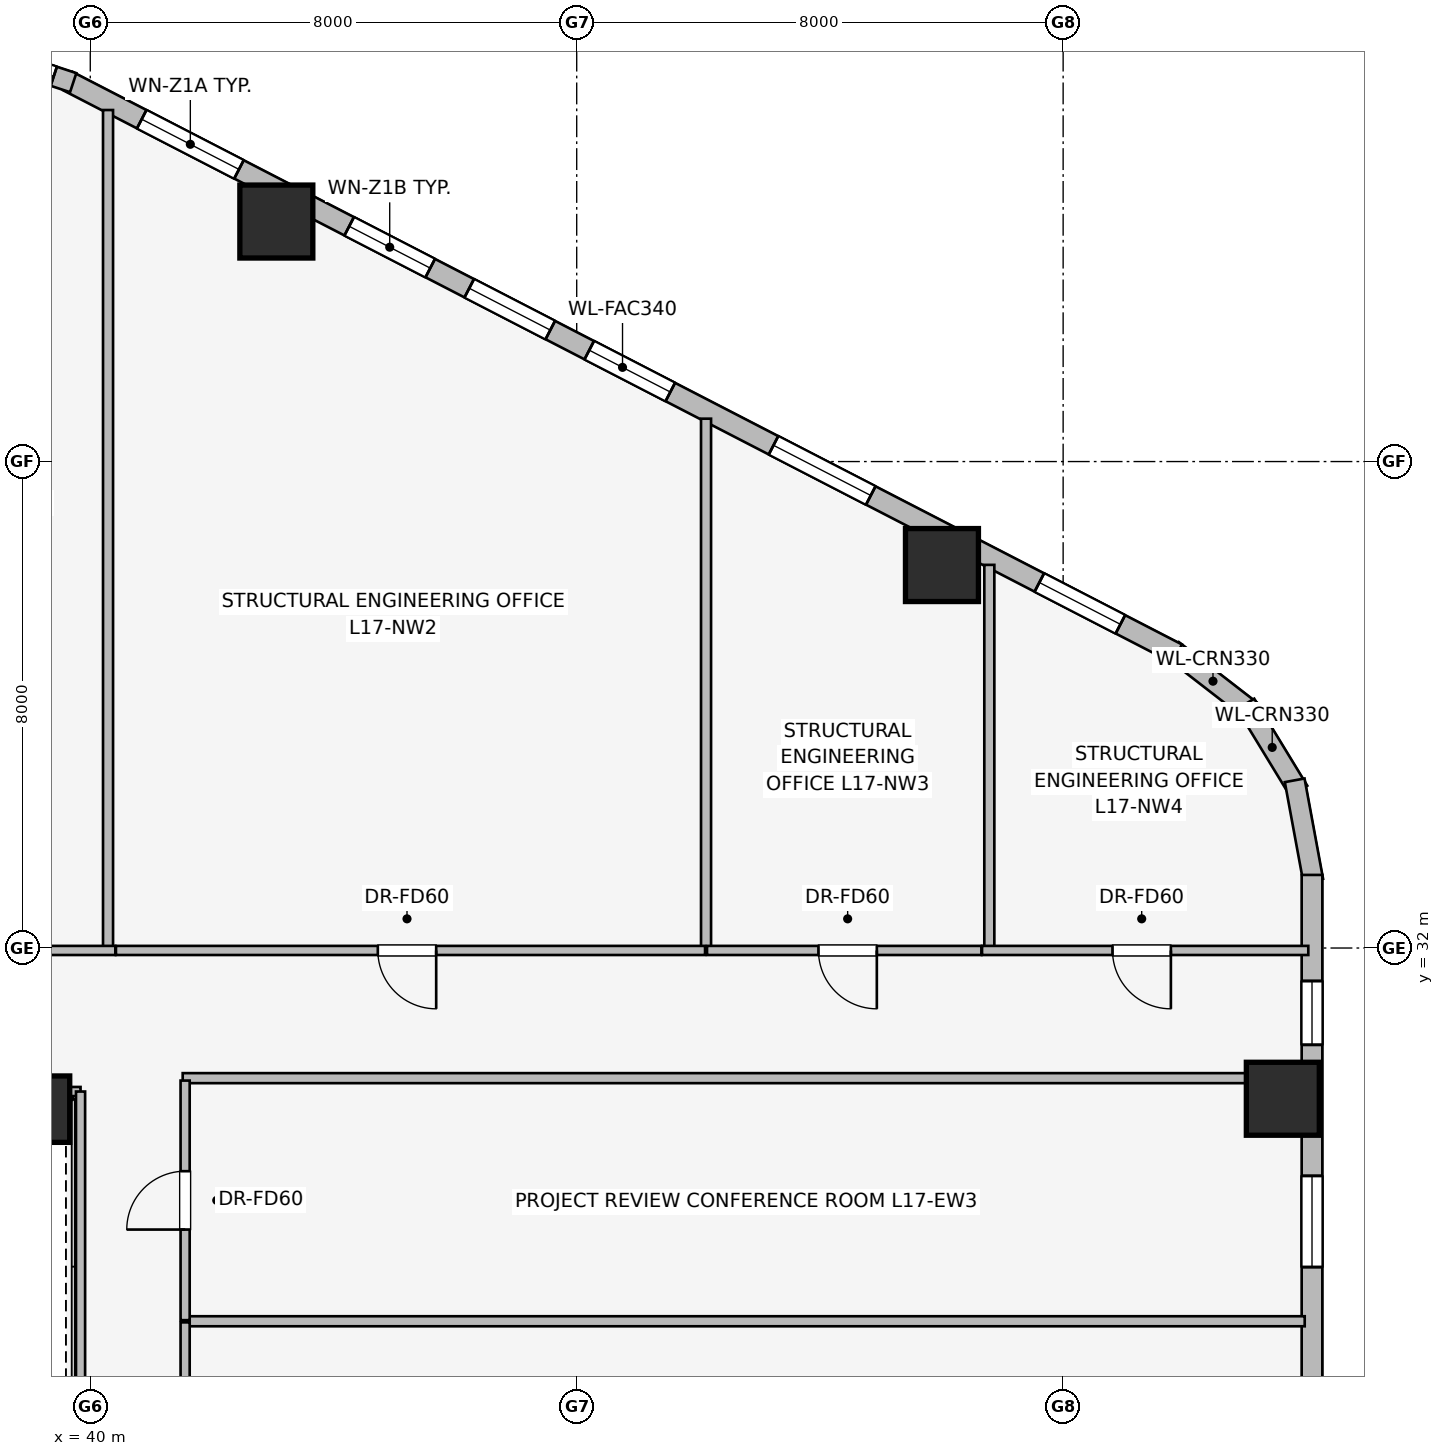
"""IFC4 building model, lengths in metres.
Left out: names, types, materials, properties, quantities, classifications, styles, units other than length and angle.
Written with IfcOpenShell. Run it as: python <this file> out.ifc"""

import sys

from ifc_helpers import new_model, si_unit, direction, frame, frame_2d, origin, origin_2d, place, context, subcontext, project, spatial, rectangle, i_section, extrude, element, fill, save


model = new_model("IFC4")
c1 = context("Model", 3, precision=1e-05, world=origin(), true_north=direction((0.0, 1.0)))
c2 = subcontext(c1, "Body", "Model", "MODEL_VIEW")
j1 = project(units=[si_unit("LENGTHUNIT", "METRE"), si_unit("PLANEANGLEUNIT", "RADIAN")], contexts=[c1])
p1 = place(None, origin())
s1 = spatial("IfcSite", under=j1, at=p1, CompositionType="ELEMENT")
p2 = place(p1, origin())
s2 = spatial("IfcBuilding", under=s1, at=p2, CompositionType="ELEMENT")
p3 = place(p2, frame((0.0, 0.0, 67.15)))
s3 = spatial("IfcBuildingStorey", under=s2, at=p3, CompositionType="ELEMENT", Elevation=67.15)
for number, where, z_axis, x_axis in (
    (1, (54.007, 38.298, 0.0), (0.0, 0.0, 1.0), (1.0, 0.0, 0.0)),
    (2, (43.06, 43.947, 0.0), (0.0, 0.0, 1.0), (1.0, 0.0, 0.0)),
    (3, (59.613, 29.521, 0.0), (0.0, 0.0, 1.0), (1.0, 0.0, 0.0)),
):
    element("IfcColumn", number, at=place(p3, frame(where, z_axis=z_axis, x_axis=x_axis)), inside=s3, PredefinedType="COLUMN", context=c2, shape_type="SweptSolid", body=[
        extrude(rectangle(XDim=1.2, YDim=1.2, at=origin_2d()), origin(), (0.0, 0.0, 1.0), 3.65),
    ])
p4 = place(p3, frame((39.45, 29.35, 0.0), z_axis=(0.0, 0.0, 1.0), x_axis=(1.0, 0.0, 0.0)))
e4 = element("IfcColumn", 4, at=p4, inside=s3, PredefinedType="COLUMN", context=c2, shape_type="SweptSolid", body=[
    extrude(i_section(OverallWidth=0.424, OverallDepth=1.092, WebThickness=0.045, FlangeThickness=0.082, at=origin_2d()), origin(), (0.0, 0.0, 1.0), 3.65),
])
p5 = place(p3, frame((57.802, 36.901, 0.0), z_axis=(0.0, 0.0, 1.0), x_axis=(0.790691856293, -0.61221433207, 0.0)))
e5 = element("IfcWall", 5, at=p5, inside=s3, PredefinedType="STANDARD", context=c2, shape_type="SweptSolid", body=[
    extrude(rectangle(XDim=1.676, YDim=0.33, at=frame_2d((0.838, 0.0))), origin(), (0.0, 0.0, 1.0), 3.39),
])
p6 = place(p3, frame((59.002, 36.015, 0.0), z_axis=(0.0, 0.0, 1.0), x_axis=(0.520584129191, -0.853810379671, 0.0)))
e6 = element("IfcWall", 6, at=p6, inside=s3, PredefinedType="STANDARD", context=c2, shape_type="SweptSolid", body=[
    extrude(rectangle(XDim=1.677, YDim=0.33, at=frame_2d((0.838, 0.0))), origin(), (0.0, 0.0, 1.0), 3.39),
])
p7 = place(p3, frame((59.808, 34.758, 0.0), z_axis=(0.0, 0.0, 1.0), x_axis=(0.181714143354, -0.983351397063, 0.0)))
e7 = element("IfcWall", 7, at=p7, inside=s3, PredefinedType="STANDARD", context=c2, shape_type="SweptSolid", body=[
    extrude(rectangle(XDim=1.678, YDim=0.33, at=frame_2d((0.839, 0.0))), origin(), (0.0, 0.0, 1.0), 3.39),
])
p8 = place(p3, frame((39.631, 46.257, 0.0), z_axis=(0.0, 0.0, 1.0), x_axis=(0.888634413993, -0.458616264721, 0.0)))
e8 = element("IfcWall", 8, at=p8, inside=s3, PredefinedType="STANDARD", context=c2, shape_type="SweptSolid", body=[
    extrude(rectangle(XDim=20.531, YDim=0.34, at=frame_2d((10.266, 0.0))), origin(), (0.0, 0.0, 1.0), 2.684),
])
p9 = place(p8, frame((1.367, 0.0, 0.75)))
e9 = element("IfcOpeningElement", 9, at=p9, cuts=e8, PredefinedType="OPENING", context=c2, shape_type="SweptSolid", body=[
    extrude(rectangle(XDim=1.8, YDim=1.5, at=frame_2d((0.9, 0.75))), frame((0.0, 0.18, 0.0), z_axis=(0.0, -1.0, 0.0), x_axis=(1.0, 0.0, 0.0)), (0.0, 0.0, 1.0), 0.36),
])
p10 = place(p8, frame((5.207, 0.0, 0.75)))
e10 = element("IfcOpeningElement", 10, at=p10, cuts=e8, PredefinedType="OPENING", context=c2, shape_type="SweptSolid", body=[
    extrude(rectangle(XDim=1.5, YDim=1.5, at=frame_2d((0.75, 0.75))), frame((0.0, 0.18, 0.0), z_axis=(0.0, -1.0, 0.0), x_axis=(1.0, 0.0, 0.0)), (0.0, 0.0, 1.0), 0.36),
])
p11 = place(p8, frame((7.429, 0.0, 0.75)))
e11 = element("IfcOpeningElement", 11, at=p11, cuts=e8, PredefinedType="OPENING", context=c2, shape_type="SweptSolid", body=[
    extrude(rectangle(XDim=1.5, YDim=1.5, at=frame_2d((0.75, 0.75))), frame((0.0, 0.18, 0.0), z_axis=(0.0, -1.0, 0.0), x_axis=(1.0, 0.0, 0.0)), (0.0, 0.0, 1.0), 0.36),
])
p12 = place(p8, frame((9.65, 0.0, 0.75)))
e12 = element("IfcOpeningElement", 12, at=p12, cuts=e8, PredefinedType="OPENING", context=c2, shape_type="SweptSolid", body=[
    extrude(rectangle(XDim=1.5, YDim=1.5, at=frame_2d((0.75, 0.75))), frame((0.0, 0.18, 0.0), z_axis=(0.0, -1.0, 0.0), x_axis=(1.0, 0.0, 0.0)), (0.0, 0.0, 1.0), 0.36),
])
p13 = place(p8, frame((13.06, 0.0, 0.75)))
e13 = element("IfcOpeningElement", 13, at=p13, cuts=e8, PredefinedType="OPENING", context=c2, shape_type="SweptSolid", body=[
    extrude(rectangle(XDim=1.8, YDim=1.5, at=frame_2d((0.9, 0.75))), frame((0.0, 0.18, 0.0), z_axis=(0.0, -1.0, 0.0), x_axis=(1.0, 0.0, 0.0)), (0.0, 0.0, 1.0), 0.36),
])
p14 = place(p8, frame((17.98, 0.0, 0.75)))
e14 = element("IfcOpeningElement", 14, at=p14, cuts=e8, PredefinedType="OPENING", context=c2, shape_type="SweptSolid", body=[
    extrude(rectangle(XDim=1.5, YDim=1.5, at=frame_2d((0.75, 0.75))), frame((0.0, 0.18, 0.0), z_axis=(0.0, -1.0, 0.0), x_axis=(1.0, 0.0, 0.0)), (0.0, 0.0, 1.0), 0.36),
])
p15 = place(p3, frame((38.083, 46.77, 0.0), z_axis=(0.0, 0.0, 1.0), x_axis=(0.94976901097, -0.312951794691, 0.0)))
e15 = element("IfcWall", 15, at=p15, inside=s3, PredefinedType="STANDARD", context=c2, shape_type="SweptSolid", body=[
    extrude(rectangle(XDim=1.722, YDim=0.33, at=frame_2d((0.861, 0.0))), origin(), (0.0, 0.0, 1.0), 3.39),
])
p16 = place(p15, frame((0.336, 0.0, 0.75)))
e16 = element("IfcOpeningElement", 16, at=p16, cuts=e15, PredefinedType="OPENING", context=c2, shape_type="SweptSolid", body=[
    extrude(rectangle(XDim=1.05, YDim=1.4, at=frame_2d((0.525, 0.7))), frame((0.0, 0.175, 0.0), z_axis=(0.0, -1.0, 0.0), x_axis=(1.0, 0.0, 0.0)), (0.0, 0.0, 1.0), 0.35),
])
p17 = place(p3, frame((60.093, 33.202, 0.0), z_axis=(0.0, 0.0, 1.0), x_axis=(0.0, -1.0, 0.0)))
e17 = element("IfcWall", 17, at=p17, inside=s3, PredefinedType="STANDARD", context=c2, shape_type="SweptSolid", body=[
    extrude(rectangle(XDim=18.404, YDim=0.34, at=frame_2d((9.202, 0.0))), origin(), (0.0, 0.0, 1.0), 2.684),
])
p18 = place(p17, frame((1.744, 0.0, 0.75)))
e18 = element("IfcOpeningElement", 18, at=p18, cuts=e17, PredefinedType="OPENING", context=c2, shape_type="SweptSolid", body=[
    extrude(rectangle(XDim=1.05, YDim=1.4, at=frame_2d((0.525, 0.7))), frame((0.0, 0.18, 0.0), z_axis=(0.0, -1.0, 0.0), x_axis=(1.0, 0.0, 0.0)), (0.0, 0.0, 1.0), 0.36),
])
p19 = place(p17, frame((4.949, 0.0, 0.75)))
e19 = element("IfcOpeningElement", 19, at=p19, cuts=e17, PredefinedType="OPENING", context=c2, shape_type="SweptSolid", body=[
    extrude(rectangle(XDim=1.5, YDim=1.5, at=frame_2d((0.75, 0.75))), frame((0.0, 0.18, 0.0), z_axis=(0.0, -1.0, 0.0), x_axis=(1.0, 0.0, 0.0)), (0.0, 0.0, 1.0), 0.36),
])
p20 = place(p17, frame((9.0, 0.0, 0.75)))
e20 = element("IfcOpeningElement", 20, at=p20, cuts=e17, PredefinedType="OPENING", context=c2, shape_type="SweptSolid", body=[
    extrude(rectangle(XDim=1.8, YDim=1.5, at=frame_2d((0.9, 0.75))), frame((0.0, 0.18, 0.0), z_axis=(0.0, -1.0, 0.0), x_axis=(1.0, 0.0, 0.0)), (0.0, 0.0, 1.0), 0.36),
])
p21 = place(p17, frame((15.65, 0.0, 0.75)))
e21 = element("IfcOpeningElement", 21, at=p21, cuts=e17, PredefinedType="OPENING", context=c2, shape_type="SweptSolid", body=[
    extrude(rectangle(XDim=1.05, YDim=1.4, at=frame_2d((0.525, 0.7))), frame((0.0, 0.18, 0.0), z_axis=(0.0, -1.0, 0.0), x_axis=(1.0, 0.0, 0.0)), (0.0, 0.0, 1.0), 0.36),
])
p22 = place(p3, frame((39.84, 29.64, 0.0), z_axis=(0.0, 0.0, 1.0), x_axis=(-1.0, 0.0, 0.0)))
e22 = element("IfcWall", 22, at=p22, inside=s3, PredefinedType="PARTITIONING", context=c2, shape_type="SweptSolid", body=[
    extrude(rectangle(XDim=12.2, YDim=0.15, at=frame_2d((6.1, 0.0))), origin(), (0.0, 0.0, 1.0), 2.531),
])
p23 = place(p3, frame((39.84, 18.36, 0.0), z_axis=(0.0, 0.0, 1.0), x_axis=(0.0, 1.0, 0.0)))
e23 = element("IfcWall", 23, at=p23, inside=s3, PredefinedType="PARTITIONING", context=c2, shape_type="SweptSolid", body=[
    extrude(rectangle(XDim=11.28, YDim=0.15, at=frame_2d((5.64, 0.0))), origin(), (0.0, 0.0, 1.0), 2.513),
])
p24 = place(p3, frame((40.292, 31.97, 0.0), z_axis=(0.0, 0.0, 1.0), x_axis=(0.0, 1.0, 0.0)))
e24 = element("IfcWall", 24, at=p24, inside=s3, PredefinedType="PARTITIONING", context=c2, shape_type="SweptSolid", body=[
    extrude(rectangle(XDim=13.811, YDim=0.165, at=frame_2d((6.906, 0.0))), origin(), (0.0, 0.0, 1.0), 2.513),
])
p25 = place(p3, frame((50.127, 31.97, 0.0), z_axis=(0.0, 0.0, 1.0), x_axis=(0.0, 1.0, 0.0)))
e25 = element("IfcWall", 25, at=p25, inside=s3, PredefinedType="PARTITIONING", context=c2, shape_type="SweptSolid", body=[
    extrude(rectangle(XDim=8.735, YDim=0.165, at=frame_2d((4.368, 0.0))), origin(), (0.0, 0.0, 1.0), 3.39),
])
p26 = place(p3, frame((54.786, 31.97, 0.0), z_axis=(0.0, 0.0, 1.0), x_axis=(0.0, 1.0, 0.0)))
e26 = element("IfcWall", 26, at=p26, inside=s3, PredefinedType="PARTITIONING", context=c2, shape_type="SweptSolid", body=[
    extrude(rectangle(XDim=6.331, YDim=0.165, at=frame_2d((3.166, 0.0))), origin(), (0.0, 0.0, 1.0), 3.39),
])
p27 = place(p3, frame((40.412, 31.96, 0.0), z_axis=(0.0, 0.0, 1.0), x_axis=(-1.0, 0.0, 0.0)))
e27 = element("IfcWall", 27, at=p27, inside=s3, PredefinedType="PARTITIONING", context=c2, shape_type="SweptSolid", body=[
    extrude(rectangle(XDim=6.122, YDim=0.15, at=frame_2d((3.061, 0.0))), origin(), (0.0, 0.0, 1.0), 3.39),
])
p28 = place(p27, frame((2.524, 0.0, 0.0)))
e28 = element("IfcOpeningElement", 28, at=p28, cuts=e27, PredefinedType="OPENING", context=c2, shape_type="SweptSolid", body=[
    extrude(rectangle(XDim=0.96, YDim=2.0, at=frame_2d((0.48, 1.0))), frame((0.0, 0.085, 0.0), z_axis=(0.0, -1.0, 0.0), x_axis=(1.0, 0.0, 0.0)), (0.0, 0.0, 1.0), 0.17),
])
p29 = place(p3, frame((50.111, 31.96, 0.0), z_axis=(0.0, 0.0, 1.0), x_axis=(-1.0, 0.0, 0.0)))
e29 = element("IfcWall", 29, at=p29, inside=s3, PredefinedType="PARTITIONING", context=c2, shape_type="SweptSolid", body=[
    extrude(rectangle(XDim=9.689, YDim=0.15, at=frame_2d((4.844, 0.0))), origin(), (0.0, 0.0, 1.0), 3.39),
])
p30 = place(p29, frame((4.422, 0.0, 0.0)))
e30 = element("IfcOpeningElement", 30, at=p30, cuts=e29, PredefinedType="OPENING", context=c2, shape_type="SweptSolid", body=[
    extrude(rectangle(XDim=0.96, YDim=2.0, at=frame_2d((0.48, 1.0))), frame((0.0, 0.085, 0.0), z_axis=(0.0, -1.0, 0.0), x_axis=(1.0, 0.0, 0.0)), (0.0, 0.0, 1.0), 0.17),
])
p31 = place(p3, frame((54.656, 31.96, 0.0), z_axis=(0.0, 0.0, 1.0), x_axis=(-1.0, 0.0, 0.0)))
e31 = element("IfcWall", 31, at=p31, inside=s3, PredefinedType="PARTITIONING", context=c2, shape_type="SweptSolid", body=[
    extrude(rectangle(XDim=4.513, YDim=0.15, at=frame_2d((2.256, 0.0))), origin(), (0.0, 0.0, 1.0), 3.39),
])
p32 = place(p31, frame((1.72, 0.0, 0.0)))
e32 = element("IfcOpeningElement", 32, at=p32, cuts=e31, PredefinedType="OPENING", context=c2, shape_type="SweptSolid", body=[
    extrude(rectangle(XDim=0.96, YDim=2.0, at=frame_2d((0.48, 1.0))), frame((0.0, 0.085, 0.0), z_axis=(0.0, -1.0, 0.0), x_axis=(1.0, 0.0, 0.0)), (0.0, 0.0, 1.0), 0.17),
])
p33 = place(p3, frame((60.032, 31.96, 0.0), z_axis=(0.0, 0.0, 1.0), x_axis=(-1.0, 0.0, 0.0)))
e33 = element("IfcWall", 33, at=p33, inside=s3, PredefinedType="PARTITIONING", context=c2, shape_type="SweptSolid", body=[
    extrude(rectangle(XDim=5.366, YDim=0.15, at=frame_2d((2.683, 0.0))), origin(), (0.0, 0.0, 1.0), 3.39),
])
p34 = place(p33, frame((2.26, 0.0, 0.0)))
e34 = element("IfcOpeningElement", 34, at=p34, cuts=e33, PredefinedType="OPENING", context=c2, shape_type="SweptSolid", body=[
    extrude(rectangle(XDim=0.96, YDim=2.0, at=frame_2d((0.48, 1.0))), frame((0.0, 0.085, 0.0), z_axis=(0.0, -1.0, 0.0), x_axis=(1.0, 0.0, 0.0)), (0.0, 0.0, 1.0), 0.17),
])
p35 = place(p3, frame((41.52, 29.86, 0.0), z_axis=(0.0, 0.0, 1.0), x_axis=(1.0, 0.0, 0.0)))
e35 = element("IfcWall", 35, at=p35, inside=s3, PredefinedType="PARTITIONING", context=c2, shape_type="SweptSolid", body=[
    extrude(rectangle(XDim=18.453, YDim=0.165, at=frame_2d((9.227, 0.0))), origin(), (0.0, 0.0, 1.0), 3.39),
])
p36 = place(p3, frame((41.59, 25.862, 0.0), z_axis=(0.0, 0.0, 1.0), x_axis=(1.0, 0.0, 0.0)))
e36 = element("IfcWall", 36, at=p36, inside=s3, PredefinedType="PARTITIONING", context=c2, shape_type="SweptSolid", body=[
    extrude(rectangle(XDim=18.383, YDim=0.165, at=frame_2d((9.191, 0.0))), origin(), (0.0, 0.0, 1.0), 3.39),
])
p37 = place(p3, frame((41.56, 20.759, 0.0), z_axis=(0.0, 0.0, 1.0), x_axis=(0.0, 1.0, 0.0)))
e37 = element("IfcWall", 37, at=p37, inside=s3, PredefinedType="PARTITIONING", context=c2, shape_type="SweptSolid", body=[
    extrude(rectangle(XDim=5.085, YDim=0.15, at=frame_2d((2.542, 0.0))), origin(), (0.0, 0.0, 1.0), 3.39),
])
p38 = place(p37, frame((2.063, 0.0, 0.0)))
e38 = element("IfcOpeningElement", 38, at=p38, cuts=e37, PredefinedType="OPENING", context=c2, shape_type="SweptSolid", body=[
    extrude(rectangle(XDim=0.96, YDim=2.0, at=frame_2d((0.48, 1.0))), frame((0.0, 0.085, 0.0), z_axis=(0.0, -1.0, 0.0), x_axis=(1.0, 0.0, 0.0)), (0.0, 0.0, 1.0), 0.17),
])
p39 = place(p3, frame((41.56, 25.88, 0.0), z_axis=(0.0, 0.0, 1.0), x_axis=(0.0, 1.0, 0.0)))
e39 = element("IfcWall", 39, at=p39, inside=s3, PredefinedType="PARTITIONING", context=c2, shape_type="SweptSolid", body=[
    extrude(rectangle(XDim=3.94, YDim=0.15, at=frame_2d((1.97, 0.0))), origin(), (0.0, 0.0, 1.0), 3.39),
])
p40 = place(p39, frame((1.49, 0.0, 0.0)))
e40 = element("IfcOpeningElement", 40, at=p40, cuts=e39, PredefinedType="OPENING", context=c2, shape_type="SweptSolid", body=[
    extrude(rectangle(XDim=0.96, YDim=2.0, at=frame_2d((0.48, 1.0))), frame((0.0, 0.085, 0.0), z_axis=(0.0, -1.0, 0.0), x_axis=(1.0, 0.0, 0.0)), (0.0, 0.0, 1.0), 0.17),
])
p41 = place(p9, origin())
e41 = element("IfcWindow", 41, at=p41, inside=s3, PartitioningType="SINGLE_PANEL", PredefinedType="WINDOW", context=c2, shape_type="SweptSolid", body=[
    extrude(rectangle(XDim=1.8, YDim=1.5, at=frame_2d((0.9, 0.75))), frame((0.0, 0.03, 0.0), z_axis=(0.0, -1.0, 0.0), x_axis=(1.0, 0.0, 0.0)), (0.0, 0.0, 1.0), 0.06),
])
fill(e9, e41)
p42 = place(p10, origin())
e42 = element("IfcWindow", 42, at=p42, inside=s3, PartitioningType="SINGLE_PANEL", PredefinedType="WINDOW", context=c2, shape_type="SweptSolid", body=[
    extrude(rectangle(XDim=1.5, YDim=1.5, at=frame_2d((0.75, 0.75))), frame((0.0, 0.03, 0.0), z_axis=(0.0, -1.0, 0.0), x_axis=(1.0, 0.0, 0.0)), (0.0, 0.0, 1.0), 0.06),
])
fill(e10, e42)
p43 = place(p11, origin())
e43 = element("IfcWindow", 43, at=p43, inside=s3, PartitioningType="SINGLE_PANEL", PredefinedType="WINDOW", context=c2, shape_type="SweptSolid", body=[
    extrude(rectangle(XDim=1.5, YDim=1.5, at=frame_2d((0.75, 0.75))), frame((0.0, 0.03, 0.0), z_axis=(0.0, -1.0, 0.0), x_axis=(1.0, 0.0, 0.0)), (0.0, 0.0, 1.0), 0.06),
])
fill(e11, e43)
p44 = place(p12, origin())
e44 = element("IfcWindow", 44, at=p44, inside=s3, PartitioningType="SINGLE_PANEL", PredefinedType="WINDOW", context=c2, shape_type="SweptSolid", body=[
    extrude(rectangle(XDim=1.5, YDim=1.5, at=frame_2d((0.75, 0.75))), frame((0.0, 0.03, 0.0), z_axis=(0.0, -1.0, 0.0), x_axis=(1.0, 0.0, 0.0)), (0.0, 0.0, 1.0), 0.06),
])
fill(e12, e44)
p45 = place(p13, origin())
e45 = element("IfcWindow", 45, at=p45, inside=s3, PartitioningType="SINGLE_PANEL", PredefinedType="WINDOW", context=c2, shape_type="SweptSolid", body=[
    extrude(rectangle(XDim=1.8, YDim=1.5, at=frame_2d((0.9, 0.75))), frame((0.0, 0.03, 0.0), z_axis=(0.0, -1.0, 0.0), x_axis=(1.0, 0.0, 0.0)), (0.0, 0.0, 1.0), 0.06),
])
fill(e13, e45)
p46 = place(p14, origin())
e46 = element("IfcWindow", 46, at=p46, inside=s3, PartitioningType="SINGLE_PANEL", PredefinedType="WINDOW", context=c2, shape_type="SweptSolid", body=[
    extrude(rectangle(XDim=1.5, YDim=1.5, at=frame_2d((0.75, 0.75))), frame((0.0, 0.03, 0.0), z_axis=(0.0, -1.0, 0.0), x_axis=(1.0, 0.0, 0.0)), (0.0, 0.0, 1.0), 0.06),
])
fill(e14, e46)
p47 = place(p16, origin())
e47 = element("IfcWindow", 47, at=p47, inside=s3, PartitioningType="SINGLE_PANEL", PredefinedType="WINDOW", context=c2, shape_type="SweptSolid", body=[
    extrude(rectangle(XDim=1.05, YDim=1.4, at=frame_2d((0.525, 0.7))), frame((0.0, 0.03, 0.0), z_axis=(0.0, -1.0, 0.0), x_axis=(1.0, 0.0, 0.0)), (0.0, 0.0, 1.0), 0.06),
])
fill(e16, e47)
p48 = place(p18, origin())
e48 = element("IfcWindow", 48, at=p48, inside=s3, PartitioningType="SINGLE_PANEL", PredefinedType="WINDOW", context=c2, shape_type="SweptSolid", body=[
    extrude(rectangle(XDim=1.05, YDim=1.4, at=frame_2d((0.525, 0.7))), frame((0.0, 0.03, 0.0), z_axis=(0.0, -1.0, 0.0), x_axis=(1.0, 0.0, 0.0)), (0.0, 0.0, 1.0), 0.06),
])
fill(e18, e48)
p49 = place(p19, origin())
e49 = element("IfcWindow", 49, at=p49, inside=s3, PartitioningType="SINGLE_PANEL", PredefinedType="WINDOW", context=c2, shape_type="SweptSolid", body=[
    extrude(rectangle(XDim=1.5, YDim=1.5, at=frame_2d((0.75, 0.75))), frame((0.0, 0.03, 0.0), z_axis=(0.0, -1.0, 0.0), x_axis=(1.0, 0.0, 0.0)), (0.0, 0.0, 1.0), 0.06),
])
fill(e19, e49)
p50 = place(p30, origin())
e50 = element("IfcDoor", 50, at=p50, inside=s3, OperationType="SINGLE_SWING_LEFT", PredefinedType="DOOR", context=c2, shape_type="SweptSolid", body=[
    extrude(rectangle(XDim=0.96, YDim=2.0, at=frame_2d((0.48, 1.0))), frame((0.0, 0.025, 0.0), z_axis=(0.0, -1.0, 0.0), x_axis=(1.0, 0.0, 0.0)), (0.0, 0.0, 1.0), 0.05),
])
fill(e30, e50)
p51 = place(p32, origin())
e51 = element("IfcDoor", 51, at=p51, inside=s3, OperationType="SINGLE_SWING_LEFT", PredefinedType="DOOR", context=c2, shape_type="SweptSolid", body=[
    extrude(rectangle(XDim=0.96, YDim=2.0, at=frame_2d((0.48, 1.0))), frame((0.0, 0.025, 0.0), z_axis=(0.0, -1.0, 0.0), x_axis=(1.0, 0.0, 0.0)), (0.0, 0.0, 1.0), 0.05),
])
fill(e32, e51)
p52 = place(p34, origin())
e52 = element("IfcDoor", 52, at=p52, inside=s3, OperationType="SINGLE_SWING_LEFT", PredefinedType="DOOR", context=c2, shape_type="SweptSolid", body=[
    extrude(rectangle(XDim=0.96, YDim=2.0, at=frame_2d((0.48, 1.0))), frame((0.0, 0.025, 0.0), z_axis=(0.0, -1.0, 0.0), x_axis=(1.0, 0.0, 0.0)), (0.0, 0.0, 1.0), 0.05),
])
fill(e34, e52)
p53 = place(p40, origin())
e53 = element("IfcDoor", 53, at=p53, inside=s3, OperationType="SINGLE_SWING_LEFT", PredefinedType="DOOR", context=c2, shape_type="SweptSolid", body=[
    extrude(rectangle(XDim=0.96, YDim=2.0, at=frame_2d((0.48, 1.0))), frame((0.0, 0.025, 0.0), z_axis=(0.0, -1.0, 0.0), x_axis=(1.0, 0.0, 0.0)), (0.0, 0.0, 1.0), 0.05),
])
fill(e40, e53)
save(model, sys.argv[1])
